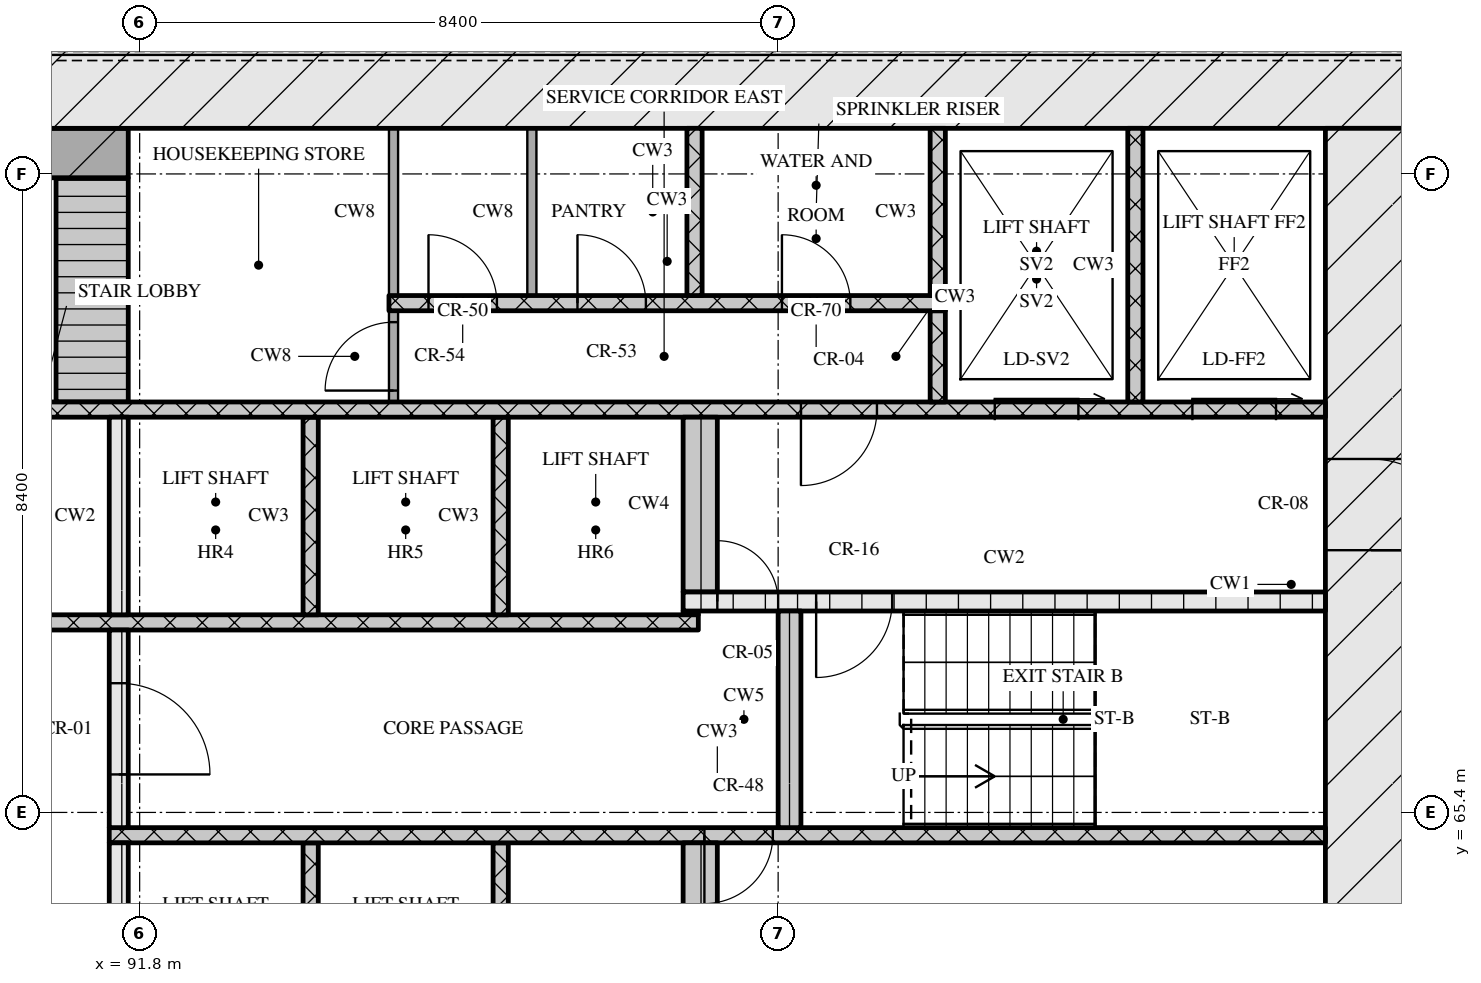
"""IFC4 building model, lengths in metres.
Left out: names, types, materials, properties, quantities, classifications, styles, units other than length and angle.
Written with IfcOpenShell. Run it as: python <this file> out.ifc"""

import sys

from ifc_helpers import new_model, si_unit, direction, frame, frame_2d, origin, place, context, subcontext, project, spatial, rectangle, extrude, element, fill, save


model = new_model("IFC4")
c1 = context("Model", 3, precision=1e-05, world=origin(), true_north=direction((0.0, 1.0)))
c2 = subcontext(c1, "Body", "Model", "MODEL_VIEW")
j1 = project(units=[si_unit("LENGTHUNIT", "METRE"), si_unit("PLANEANGLEUNIT", "RADIAN")], contexts=[c1])
p1 = place(None, origin())
s1 = spatial("IfcSite", under=j1, at=p1, CompositionType="ELEMENT")
p2 = place(p1, origin())
s2 = spatial("IfcBuilding", under=s1, at=p2, CompositionType="ELEMENT")
p3 = place(p2, frame((0.0, 0.0, 66.0)))
s3 = spatial("IfcBuildingStorey", under=s2, at=p3, CompositionType="ELEMENT", Elevation=66.0)
p4 = place(p3, frame((66.6, 75.0, 0.0), z_axis=(0.0, 0.0, 1.0), x_axis=(1.0, 0.0, 0.0)))
e1 = element("IfcWall", 1, at=p4, inside=s3, PredefinedType="SOLIDWALL", context=c2, shape_type="SweptSolid", body=[
    extrude(rectangle(XDim=42.0, YDim=1.2, at=frame_2d((21.0, 0.0))), origin(), (0.0, 0.0, 1.0), 3.32),
])
p5 = place(p3, frame((108.0, 62.4, 0.0), z_axis=(0.0, 0.0, 1.0), x_axis=(0.0, 1.0, 0.0)))
e2 = element("IfcWall", 2, at=p5, inside=s3, PredefinedType="SOLIDWALL", context=c2, shape_type="SweptSolid", body=[
    extrude(rectangle(XDim=12.0, YDim=1.2, at=frame_2d((6.0, 0.0))), origin(), (0.0, 0.0, 1.0), 3.32),
])
p6 = place(p5, frame((6.45, 0.0, 0.0)))
e3 = element("IfcOpeningElement", 3, at=p6, cuts=e2, PredefinedType="OPENING", context=c2, shape_type="SweptSolid", body=[
    extrude(rectangle(XDim=1.2, YDim=2.1, at=frame_2d((0.6, 1.05))), frame((0.0, 0.61, 0.0), z_axis=(0.0, -1.0, 0.0), x_axis=(1.0, 0.0, 0.0)), (0.0, 0.0, 1.0), 1.22),
])
p7 = place(p3, frame((91.525, 62.4, 0.0), z_axis=(0.0, 0.0, 1.0), x_axis=(0.0, 1.0, 0.0)))
e4 = element("IfcWall", 4, at=p7, inside=s3, PredefinedType="SOLIDWALL", context=c2, shape_type="SweptSolid", body=[
    extrude(rectangle(XDim=2.6, YDim=0.25, at=frame_2d((1.3, 0.0))), origin(), (0.0, 0.0, 1.0), 3.32),
])
for number, where, z_axis, x_axis in (
    (5, (94.05, 62.4, 0.0), (0.0, 0.0, 1.0), (0.0, 1.0, 0.0)),
    (6, (96.55, 62.4, 0.0), (0.0, 0.0, 1.0), (0.0, 1.0, 0.0)),
):
    element("IfcWall", number, at=place(p3, frame(where, z_axis=z_axis, x_axis=x_axis)), inside=s3, PredefinedType="SOLIDWALL", context=c2, shape_type="SweptSolid", body=[
        extrude(rectangle(XDim=2.6, YDim=0.2, at=frame_2d((1.3, 0.0))), origin(), (0.0, 0.0, 1.0), 3.32),
    ])
p8 = place(p3, frame((99.175, 62.4, 0.0), z_axis=(0.0, 0.0, 1.0), x_axis=(0.0, 1.0, 0.0)))
e7 = element("IfcWall", 7, at=p8, inside=s3, PredefinedType="SOLIDWALL", context=c2, shape_type="SweptSolid", body=[
    extrude(rectangle(XDim=2.6, YDim=0.45, at=frame_2d((1.3, 0.0))), origin(), (0.0, 0.0, 1.0), 3.32),
])
p9 = place(p3, frame((91.4, 65.1, 0.0), z_axis=(0.0, 0.0, 1.0), x_axis=(1.0, 0.0, 0.0)))
e8 = element("IfcWall", 8, at=p9, inside=s3, PredefinedType="SOLIDWALL", context=c2, shape_type="SweptSolid", body=[
    extrude(rectangle(XDim=16.0, YDim=0.2, at=frame_2d((8.0, 0.0))), origin(), (0.0, 0.0, 1.0), 3.32),
])
p10 = place(p9, frame((7.83, 0.0, 0.0)))
e9 = element("IfcOpeningElement", 9, at=p10, cuts=e8, PredefinedType="OPENING", context=c2, shape_type="SweptSolid", body=[
    extrude(rectangle(XDim=0.9, YDim=2.1, at=frame_2d((0.45, 1.05))), frame((0.0, 0.11, 0.0), z_axis=(0.0, -1.0, 0.0), x_axis=(1.0, 0.0, 0.0)), (0.0, 0.0, 1.0), 0.22),
])
p11 = place(p3, frame((91.525, 65.2, 0.0), z_axis=(0.0, 0.0, 1.0), x_axis=(0.0, 1.0, 0.0)))
e10 = element("IfcWall", 10, at=p11, inside=s3, PredefinedType="SOLIDWALL", context=c2, shape_type="SweptSolid", body=[
    extrude(rectangle(XDim=2.6, YDim=0.25, at=frame_2d((1.3, 0.0))), origin(), (0.0, 0.0, 1.0), 3.32),
])
p12 = place(p11, frame((0.7, 0.0, 0.0)))
e11 = element("IfcOpeningElement", 11, at=p12, cuts=e10, PredefinedType="OPENING", context=c2, shape_type="SweptSolid", body=[
    extrude(rectangle(XDim=1.2, YDim=2.1, at=frame_2d((0.6, 1.05))), frame((0.0, 0.135, 0.0), z_axis=(0.0, -1.0, 0.0), x_axis=(1.0, 0.0, 0.0)), (0.0, 0.0, 1.0), 0.27),
])
p13 = place(p3, frame((100.35, 65.2, 0.0), z_axis=(0.0, 0.0, 1.0), x_axis=(0.0, 1.0, 0.0)))
e12 = element("IfcWall", 12, at=p13, inside=s3, PredefinedType="SOLIDWALL", context=c2, shape_type="SweptSolid", body=[
    extrude(rectangle(XDim=2.85, YDim=0.3, at=frame_2d((1.425, 0.0))), origin(), (0.0, 0.0, 1.0), 3.32),
])
p14 = place(p3, frame((76.05, 67.9, 0.0), z_axis=(0.0, 0.0, 1.0), x_axis=(1.0, 0.0, 0.0)))
e13 = element("IfcWall", 13, at=p14, inside=s3, PredefinedType="SOLIDWALL", context=c2, shape_type="SweptSolid", body=[
    extrude(rectangle(XDim=23.1, YDim=0.2, at=frame_2d((11.55, 0.0))), origin(), (0.0, 0.0, 1.0), 3.32),
])
p15 = place(p14, frame((0.6, 0.0, 0.0)))
e14 = element("IfcOpeningElement", 14, at=p15, cuts=e13, PredefinedType="OPENING", context=c2, shape_type="SweptSolid", body=[
    extrude(rectangle(XDim=1.1, YDim=2.1, at=frame_2d((0.55, 1.05))), frame((0.0, 0.11, 0.0), z_axis=(0.0, -1.0, 0.0), x_axis=(1.0, 0.0, 0.0)), (0.0, 0.0, 1.0), 0.22),
])
p16 = place(p14, frame((3.1, 0.0, 0.0)))
e15 = element("IfcOpeningElement", 15, at=p16, cuts=e13, PredefinedType="OPENING", context=c2, shape_type="SweptSolid", body=[
    extrude(rectangle(XDim=1.1, YDim=2.1, at=frame_2d((0.55, 1.05))), frame((0.0, 0.11, 0.0), z_axis=(0.0, -1.0, 0.0), x_axis=(1.0, 0.0, 0.0)), (0.0, 0.0, 1.0), 0.22),
])
p17 = place(p14, frame((5.6, 0.0, 0.0)))
e16 = element("IfcOpeningElement", 16, at=p17, cuts=e13, PredefinedType="OPENING", context=c2, shape_type="SweptSolid", body=[
    extrude(rectangle(XDim=1.1, YDim=2.1, at=frame_2d((0.55, 1.05))), frame((0.0, 0.11, 0.0), z_axis=(0.0, -1.0, 0.0), x_axis=(1.0, 0.0, 0.0)), (0.0, 0.0, 1.0), 0.22),
])
p18 = place(p14, frame((8.45, 0.0, 0.0)))
e17 = element("IfcOpeningElement", 17, at=p18, cuts=e13, PredefinedType="OPENING", context=c2, shape_type="SweptSolid", body=[
    extrude(rectangle(XDim=0.9, YDim=2.1, at=frame_2d((0.45, 1.05))), frame((0.0, 0.11, 0.0), z_axis=(0.0, -1.0, 0.0), x_axis=(1.0, 0.0, 0.0)), (0.0, 0.0, 1.0), 0.22),
])
p19 = place(p14, frame((10.91, 0.0, 0.0)))
e18 = element("IfcOpeningElement", 18, at=p19, cuts=e13, PredefinedType="OPENING", context=c2, shape_type="SweptSolid", body=[
    extrude(rectangle(XDim=0.9, YDim=2.1, at=frame_2d((0.45, 1.05))), frame((0.0, 0.11, 0.0), z_axis=(0.0, -1.0, 0.0), x_axis=(1.0, 0.0, 0.0)), (0.0, 0.0, 1.0), 0.22),
])
p20 = place(p14, frame((13.55, 0.0, 0.0)))
e19 = element("IfcOpeningElement", 19, at=p20, cuts=e13, PredefinedType="OPENING", context=c2, shape_type="SweptSolid", body=[
    extrude(rectangle(XDim=1.0, YDim=2.1, at=frame_2d((0.5, 1.05))), frame((0.0, 0.11, 0.0), z_axis=(0.0, -1.0, 0.0), x_axis=(1.0, 0.0, 0.0)), (0.0, 0.0, 1.0), 0.22),
])
p21 = place(p3, frame((91.525, 68.0, 0.0), z_axis=(0.0, 0.0, 1.0), x_axis=(0.0, 1.0, 0.0)))
e20 = element("IfcWall", 20, at=p21, inside=s3, PredefinedType="SOLIDWALL", context=c2, shape_type="SweptSolid", body=[
    extrude(rectangle(XDim=2.6, YDim=0.25, at=frame_2d((1.3, 0.0))), origin(), (0.0, 0.0, 1.0), 3.32),
])
for number, where, z_axis, x_axis in (
    (21, (94.05, 68.0, 0.0), (0.0, 0.0, 1.0), (0.0, 1.0, 0.0)),
    (22, (96.55, 68.0, 0.0), (0.0, 0.0, 1.0), (0.0, 1.0, 0.0)),
):
    element("IfcWall", number, at=place(p3, frame(where, z_axis=z_axis, x_axis=x_axis)), inside=s3, PredefinedType="SOLIDWALL", context=c2, shape_type="SweptSolid", body=[
        extrude(rectangle(XDim=2.6, YDim=0.2, at=frame_2d((1.3, 0.0))), origin(), (0.0, 0.0, 1.0), 3.32),
    ])
p22 = place(p3, frame((98.95, 68.025, 0.0), z_axis=(0.0, 0.0, 1.0), x_axis=(1.0, 0.0, 0.0)))
e23 = element("IfcWall", 23, at=p22, inside=s3, PredefinedType="SOLIDWALL", context=c2, shape_type="SweptSolid", body=[
    extrude(rectangle(XDim=0.2, YDim=0.05, at=frame_2d((0.1, 0.0))), origin(), (0.0, 0.0, 1.0), 3.32),
])
p23 = place(p3, frame((98.95, 68.175, 0.0), z_axis=(0.0, 0.0, 1.0), x_axis=(1.0, 0.0, 0.0)))
e24 = element("IfcWall", 24, at=p23, inside=s3, PredefinedType="SOLIDWALL", context=c2, shape_type="SweptSolid", body=[
    extrude(rectangle(XDim=8.45, YDim=0.25, at=frame_2d((4.225, 0.0))), origin(), (0.0, 0.0, 1.0), 3.32),
])
p24 = place(p23, frame((0.45, 0.0, 0.0)))
e25 = element("IfcOpeningElement", 25, at=p24, cuts=e24, PredefinedType="OPENING", context=c2, shape_type="SweptSolid", body=[
    extrude(rectangle(XDim=0.8, YDim=2.1, at=frame_2d((0.4, 1.05))), frame((0.0, 0.135, 0.0), z_axis=(0.0, -1.0, 0.0), x_axis=(1.0, 0.0, 0.0)), (0.0, 0.0, 1.0), 0.27),
])
p25 = place(p23, frame((1.75, 0.0, 0.0)))
e26 = element("IfcOpeningElement", 26, at=p25, cuts=e24, PredefinedType="OPENING", context=c2, shape_type="SweptSolid", body=[
    extrude(rectangle(XDim=1.0, YDim=2.1, at=frame_2d((0.5, 1.05))), frame((0.0, 0.135, 0.0), z_axis=(0.0, -1.0, 0.0), x_axis=(1.0, 0.0, 0.0)), (0.0, 0.0, 1.0), 0.27),
])
p26 = place(p3, frame((99.175, 68.3, 0.0), z_axis=(0.0, 0.0, 1.0), x_axis=(0.0, 1.0, 0.0)))
e27 = element("IfcWall", 27, at=p26, inside=s3, PredefinedType="SOLIDWALL", context=c2, shape_type="SweptSolid", body=[
    extrude(rectangle(XDim=2.3, YDim=0.45, at=frame_2d((1.15, 0.0))), origin(), (0.0, 0.0, 1.0), 3.32),
])
p27 = place(p3, frame((67.8, 70.7, 0.0), z_axis=(0.0, 0.0, 1.0), x_axis=(1.0, 0.0, 0.0)))
e28 = element("IfcWall", 28, at=p27, inside=s3, PredefinedType="SOLIDWALL", context=c2, shape_type="SweptSolid", body=[
    extrude(rectangle(XDim=39.6, YDim=0.2, at=frame_2d((19.8, 0.0))), origin(), (0.0, 0.0, 1.0), 3.32),
])
p28 = place(p27, frame((0.65, 0.0, 0.0)))
e29 = element("IfcOpeningElement", 29, at=p28, cuts=e28, PredefinedType="OPENING", context=c2, shape_type="SweptSolid", body=[
    extrude(rectangle(XDim=1.1, YDim=2.1, at=frame_2d((0.55, 1.05))), frame((0.0, 0.11, 0.0), z_axis=(0.0, -1.0, 0.0), x_axis=(1.0, 0.0, 0.0)), (0.0, 0.0, 1.0), 0.22),
])
p29 = place(p27, frame((3.25, 0.0, 0.0)))
e30 = element("IfcOpeningElement", 30, at=p29, cuts=e28, PredefinedType="OPENING", context=c2, shape_type="SweptSolid", body=[
    extrude(rectangle(XDim=1.1, YDim=2.1, at=frame_2d((0.55, 1.05))), frame((0.0, 0.11, 0.0), z_axis=(0.0, -1.0, 0.0), x_axis=(1.0, 0.0, 0.0)), (0.0, 0.0, 1.0), 0.22),
])
p30 = place(p27, frame((5.9, 0.0, 0.0)))
e31 = element("IfcOpeningElement", 31, at=p30, cuts=e28, PredefinedType="OPENING", context=c2, shape_type="SweptSolid", body=[
    extrude(rectangle(XDim=1.0, YDim=2.1, at=frame_2d((0.5, 1.05))), frame((0.0, 0.11, 0.0), z_axis=(0.0, -1.0, 0.0), x_axis=(1.0, 0.0, 0.0)), (0.0, 0.0, 1.0), 0.22),
])
p31 = place(p27, frame((21.7, 0.0, 0.0)))
e32 = element("IfcOpeningElement", 32, at=p31, cuts=e28, PredefinedType="OPENING", context=c2, shape_type="SweptSolid", body=[
    extrude(rectangle(XDim=1.0, YDim=2.1, at=frame_2d((0.5, 1.05))), frame((0.0, 0.11, 0.0), z_axis=(0.0, -1.0, 0.0), x_axis=(1.0, 0.0, 0.0)), (0.0, 0.0, 1.0), 0.22),
])
p32 = place(p27, frame((32.7, 0.0, 0.0)))
e33 = element("IfcOpeningElement", 33, at=p32, cuts=e28, PredefinedType="OPENING", context=c2, shape_type="SweptSolid", body=[
    extrude(rectangle(XDim=1.0, YDim=2.1, at=frame_2d((0.5, 1.05))), frame((0.0, 0.11, 0.0), z_axis=(0.0, -1.0, 0.0), x_axis=(1.0, 0.0, 0.0)), (0.0, 0.0, 1.0), 0.22),
])
p33 = place(p27, frame((35.25, 0.0, 0.0)))
e34 = element("IfcOpeningElement", 34, at=p33, cuts=e28, PredefinedType="OPENING", context=c2, shape_type="SweptSolid", body=[
    extrude(rectangle(XDim=1.1, YDim=2.1, at=frame_2d((0.55, 1.05))), frame((0.0, 0.11, 0.0), z_axis=(0.0, -1.0, 0.0), x_axis=(1.0, 0.0, 0.0)), (0.0, 0.0, 1.0), 0.22),
])
p34 = place(p27, frame((37.85, 0.0, 0.0)))
e35 = element("IfcOpeningElement", 35, at=p34, cuts=e28, PredefinedType="OPENING", context=c2, shape_type="SweptSolid", body=[
    extrude(rectangle(XDim=1.1, YDim=2.1, at=frame_2d((0.55, 1.05))), frame((0.0, 0.11, 0.0), z_axis=(0.0, -1.0, 0.0), x_axis=(1.0, 0.0, 0.0)), (0.0, 0.0, 1.0), 0.22),
])
p35 = place(p3, frame((91.175, 70.8, 0.0), z_axis=(0.0, 0.0, 1.0), x_axis=(0.0, 1.0, 0.0)))
e36 = element("IfcWall", 36, at=p35, inside=s3, PredefinedType="SOLIDWALL", context=c2, shape_type="SweptSolid", body=[
    extrude(rectangle(XDim=2.95, YDim=0.95, at=frame_2d((1.475, 0.0))), origin(), (0.0, 0.0, 1.0), 3.32),
])
p36 = place(p3, frame((95.14, 70.8, 0.0), z_axis=(0.0, 0.0, 1.0), x_axis=(0.0, 1.0, 0.0)))
e37 = element("IfcWall", 37, at=p36, inside=s3, PredefinedType="PARTITIONING", context=c2, shape_type="SweptSolid", body=[
    extrude(rectangle(XDim=1.2, YDim=0.12, at=frame_2d((0.6, 0.0))), origin(), (0.0, 0.0, 1.0), 3.32),
])
p37 = place(p36, frame((0.15, 0.0, 0.0)))
e38 = element("IfcOpeningElement", 38, at=p37, cuts=e37, PredefinedType="OPENING", context=c2, shape_type="SweptSolid", body=[
    extrude(rectangle(XDim=0.9, YDim=2.1, at=frame_2d((0.45, 1.05))), frame((0.0, 0.07, 0.0), z_axis=(0.0, -1.0, 0.0), x_axis=(1.0, 0.0, 0.0)), (0.0, 0.0, 1.0), 0.14),
])
p38 = place(p3, frame((102.3, 70.8, 0.0), z_axis=(0.0, 0.0, 1.0), x_axis=(0.0, 1.0, 0.0)))
e39 = element("IfcWall", 39, at=p38, inside=s3, PredefinedType="SOLIDWALL", context=c2, shape_type="SweptSolid", body=[
    extrude(rectangle(XDim=1.2, YDim=0.2, at=frame_2d((0.6, 0.0))), origin(), (0.0, 0.0, 1.0), 3.32),
])
p39 = place(p3, frame((104.9, 70.8, 0.0), z_axis=(0.0, 0.0, 1.0), x_axis=(0.0, 1.0, 0.0)))
e40 = element("IfcWall", 40, at=p39, inside=s3, PredefinedType="SOLIDWALL", context=c2, shape_type="SweptSolid", body=[
    extrude(rectangle(XDim=3.6, YDim=0.2, at=frame_2d((1.8, 0.0))), origin(), (0.0, 0.0, 1.0), 3.32),
])
p40 = place(p3, frame((95.08, 72.1, 0.0), z_axis=(0.0, 0.0, 1.0), x_axis=(1.0, 0.0, 0.0)))
e41 = element("IfcWall", 41, at=p40, inside=s3, PredefinedType="SOLIDWALL", context=c2, shape_type="SweptSolid", body=[
    extrude(rectangle(XDim=7.32, YDim=0.2, at=frame_2d((3.66, 0.0))), origin(), (0.0, 0.0, 1.0), 3.32),
])
p41 = place(p40, frame((0.52, 0.0, 0.0)))
e42 = element("IfcOpeningElement", 42, at=p41, cuts=e41, PredefinedType="OPENING", context=c2, shape_type="SweptSolid", body=[
    extrude(rectangle(XDim=0.9, YDim=2.1, at=frame_2d((0.45, 1.05))), frame((0.0, 0.11, 0.0), z_axis=(0.0, -1.0, 0.0), x_axis=(1.0, 0.0, 0.0)), (0.0, 0.0, 1.0), 0.22),
])
p42 = place(p40, frame((2.48, 0.0, 0.0)))
e43 = element("IfcOpeningElement", 43, at=p42, cuts=e41, PredefinedType="OPENING", context=c2, shape_type="SweptSolid", body=[
    extrude(rectangle(XDim=0.9, YDim=2.1, at=frame_2d((0.45, 1.05))), frame((0.0, 0.11, 0.0), z_axis=(0.0, -1.0, 0.0), x_axis=(1.0, 0.0, 0.0)), (0.0, 0.0, 1.0), 0.22),
])
p43 = place(p40, frame((5.17, 0.0, 0.0)))
e44 = element("IfcOpeningElement", 44, at=p43, cuts=e41, PredefinedType="OPENING", context=c2, shape_type="SweptSolid", body=[
    extrude(rectangle(XDim=0.9, YDim=2.1, at=frame_2d((0.45, 1.05))), frame((0.0, 0.11, 0.0), z_axis=(0.0, -1.0, 0.0), x_axis=(1.0, 0.0, 0.0)), (0.0, 0.0, 1.0), 0.22),
])
for number, where, z_axis, x_axis in (
    (45, (95.14, 72.2, 0.0), (0.0, 0.0, 1.0), (0.0, 1.0, 0.0)),
    (46, (96.96, 72.2, 0.0), (0.0, 0.0, 1.0), (0.0, 1.0, 0.0)),
):
    element("IfcWall", number, at=place(p3, frame(where, z_axis=z_axis, x_axis=x_axis)), inside=s3, PredefinedType="PARTITIONING", context=c2, shape_type="SweptSolid", body=[
        extrude(rectangle(XDim=2.2, YDim=0.12, at=frame_2d((1.1, 0.0))), origin(), (0.0, 0.0, 1.0), 3.32),
    ])
for number, where, z_axis, x_axis in (
    (47, (99.1, 72.2, 0.0), (0.0, 0.0, 1.0), (0.0, 1.0, 0.0)),
    (48, (102.3, 72.2, 0.0), (0.0, 0.0, 1.0), (0.0, 1.0, 0.0)),
):
    element("IfcWall", number, at=place(p3, frame(where, z_axis=z_axis, x_axis=x_axis)), inside=s3, PredefinedType="SOLIDWALL", context=c2, shape_type="SweptSolid", body=[
        extrude(rectangle(XDim=2.2, YDim=0.2, at=frame_2d((1.1, 0.0))), origin(), (0.0, 0.0, 1.0), 3.32),
    ])
p44 = place(p3, frame((83.55, 74.075, 0.0), z_axis=(0.0, 0.0, 1.0), x_axis=(1.0, 0.0, 0.0)))
e49 = element("IfcWall", 49, at=p44, inside=s3, PredefinedType="SOLIDWALL", context=c2, shape_type="SweptSolid", body=[
    extrude(rectangle(XDim=8.1, YDim=0.65, at=frame_2d((4.05, 0.0))), origin(), (0.0, 0.0, 1.0), 3.32),
])
p45 = place(p10, origin())
e50 = element("IfcDoor", 50, at=p45, inside=s3, OperationType="SINGLE_SWING_RIGHT", PredefinedType="DOOR", context=c2, shape_type="SweptSolid", body=[
    extrude(rectangle(XDim=0.9, YDim=2.1, at=frame_2d((0.45, 1.05))), frame((0.0, 0.025, 0.0), z_axis=(0.0, -1.0, 0.0), x_axis=(1.0, 0.0, 0.0)), (0.0, 0.0, 1.0), 0.05),
])
fill(e9, e50)
p46 = place(p12, origin())
e51 = element("IfcDoor", 51, at=p46, inside=s3, OperationType="SINGLE_SWING_RIGHT", PredefinedType="DOOR", context=c2, shape_type="SweptSolid", body=[
    extrude(rectangle(XDim=1.2, YDim=2.1, at=frame_2d((0.6, 1.05))), frame((0.0, 0.025, 0.0), z_axis=(0.0, -1.0, 0.0), x_axis=(1.0, 0.0, 0.0)), (0.0, 0.0, 1.0), 0.05),
])
fill(e11, e51)
p47 = place(p24, origin())
e52 = element("IfcDoor", 52, at=p47, inside=s3, OperationType="SINGLE_SWING_LEFT", PredefinedType="DOOR", context=c2, shape_type="SweptSolid", body=[
    extrude(rectangle(XDim=0.8, YDim=2.1, at=frame_2d((0.4, 1.05))), frame((0.0, 0.025, 0.0), z_axis=(0.0, -1.0, 0.0), x_axis=(1.0, 0.0, 0.0)), (0.0, 0.0, 1.0), 0.05),
])
fill(e25, e52)
p48 = place(p25, origin())
e53 = element("IfcDoor", 53, at=p48, inside=s3, OperationType="SINGLE_SWING_RIGHT", PredefinedType="DOOR", context=c2, shape_type="SweptSolid", body=[
    extrude(rectangle(XDim=1.0, YDim=2.1, at=frame_2d((0.5, 1.05))), frame((0.0, 0.025, 0.0), z_axis=(0.0, -1.0, 0.0), x_axis=(1.0, 0.0, 0.0)), (0.0, 0.0, 1.0), 0.05),
])
fill(e26, e53)
p49 = place(p6, origin())
e54 = element("IfcDoor", 54, at=p49, inside=s3, OperationType="SINGLE_SWING_RIGHT", PredefinedType="DOOR", context=c2, shape_type="SweptSolid", body=[
    extrude(rectangle(XDim=1.2, YDim=2.1, at=frame_2d((0.6, 1.05))), frame((0.0, 0.025, 0.0), z_axis=(0.0, -1.0, 0.0), x_axis=(1.0, 0.0, 0.0)), (0.0, 0.0, 1.0), 0.05),
])
fill(e3, e54)
p50 = place(p32, origin())
e55 = element("IfcDoor", 55, at=p50, inside=s3, OperationType="SINGLE_SWING_RIGHT", PredefinedType="DOOR", context=c2, shape_type="SweptSolid", body=[
    extrude(rectangle(XDim=1.0, YDim=2.1, at=frame_2d((0.5, 1.05))), frame((0.0, 0.025, 0.0), z_axis=(0.0, -1.0, 0.0), x_axis=(1.0, 0.0, 0.0)), (0.0, 0.0, 1.0), 0.05),
])
fill(e33, e55)
p51 = place(p33, origin())
e56 = element("IfcDoor", 56, at=p51, inside=s3, OperationType="SLIDING_TO_RIGHT", PredefinedType="DOOR", context=c2, shape_type="SweptSolid", body=[
    extrude(rectangle(XDim=1.1, YDim=2.1, at=frame_2d((0.55, 1.05))), frame((0.0, 0.025, 0.0), z_axis=(0.0, -1.0, 0.0), x_axis=(1.0, 0.0, 0.0)), (0.0, 0.0, 1.0), 0.05),
])
fill(e34, e56)
p52 = place(p34, origin())
e57 = element("IfcDoor", 57, at=p52, inside=s3, OperationType="SLIDING_TO_RIGHT", PredefinedType="DOOR", context=c2, shape_type="SweptSolid", body=[
    extrude(rectangle(XDim=1.1, YDim=2.1, at=frame_2d((0.55, 1.05))), frame((0.0, 0.025, 0.0), z_axis=(0.0, -1.0, 0.0), x_axis=(1.0, 0.0, 0.0)), (0.0, 0.0, 1.0), 0.05),
])
fill(e35, e57)
p53 = place(p37, origin())
e58 = element("IfcDoor", 58, at=p53, inside=s3, OperationType="SINGLE_SWING_LEFT", PredefinedType="DOOR", context=c2, shape_type="SweptSolid", body=[
    extrude(rectangle(XDim=0.9, YDim=2.1, at=frame_2d((0.45, 1.05))), frame((0.0, 0.025, 0.0), z_axis=(0.0, -1.0, 0.0), x_axis=(1.0, 0.0, 0.0)), (0.0, 0.0, 1.0), 0.05),
])
fill(e38, e58)
p54 = place(p41, origin())
e59 = element("IfcDoor", 59, at=p54, inside=s3, OperationType="SINGLE_SWING_LEFT", PredefinedType="DOOR", context=c2, shape_type="SweptSolid", body=[
    extrude(rectangle(XDim=0.9, YDim=2.1, at=frame_2d((0.45, 1.05))), frame((0.0, 0.025, 0.0), z_axis=(0.0, -1.0, 0.0), x_axis=(1.0, 0.0, 0.0)), (0.0, 0.0, 1.0), 0.05),
])
fill(e42, e59)
p55 = place(p42, origin())
e60 = element("IfcDoor", 60, at=p55, inside=s3, OperationType="SINGLE_SWING_LEFT", PredefinedType="DOOR", context=c2, shape_type="SweptSolid", body=[
    extrude(rectangle(XDim=0.9, YDim=2.1, at=frame_2d((0.45, 1.05))), frame((0.0, 0.025, 0.0), z_axis=(0.0, -1.0, 0.0), x_axis=(1.0, 0.0, 0.0)), (0.0, 0.0, 1.0), 0.05),
])
fill(e43, e60)
p56 = place(p43, origin())
e61 = element("IfcDoor", 61, at=p56, inside=s3, OperationType="SINGLE_SWING_LEFT", PredefinedType="DOOR", context=c2, shape_type="SweptSolid", body=[
    extrude(rectangle(XDim=0.9, YDim=2.1, at=frame_2d((0.45, 1.05))), frame((0.0, 0.025, 0.0), z_axis=(0.0, -1.0, 0.0), x_axis=(1.0, 0.0, 0.0)), (0.0, 0.0, 1.0), 0.05),
])
fill(e44, e61)
save(model, sys.argv[1])
